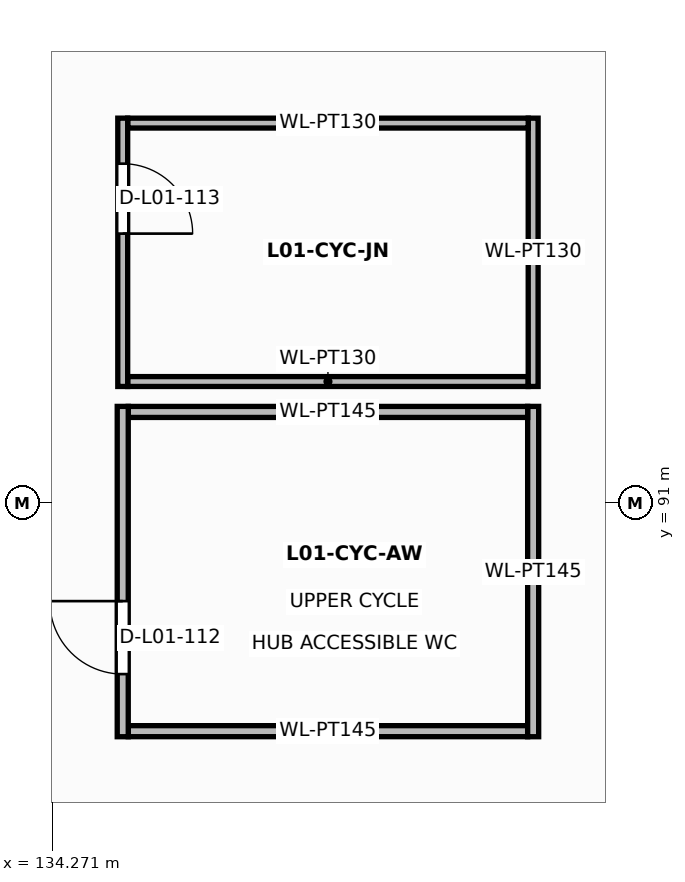
"""IFC4 building model, lengths in metres.
Left out: names, types, materials, properties, quantities, classifications, styles, units other than length and angle.
Written with IfcOpenShell. Run it as: python <this file> out.ifc"""

import sys

from ifc_helpers import new_model, si_unit, direction, frame, frame_2d, origin, place, context, subcontext, project, spatial, rectangle, extrude, element, fill, save


model = new_model("IFC4")
c1 = context("Model", 3, precision=1e-05, world=origin(), true_north=direction((0.0, 1.0)))
c2 = subcontext(c1, "Body", "Model", "MODEL_VIEW")
j1 = project(units=[si_unit("LENGTHUNIT", "METRE"), si_unit("PLANEANGLEUNIT", "RADIAN")], contexts=[c1])
p1 = place(None, origin())
s1 = spatial("IfcSite", under=j1, at=p1, CompositionType="ELEMENT")
p2 = place(p1, origin())
s2 = spatial("IfcBuilding", under=s1, at=p2, CompositionType="ELEMENT")
p3 = place(p2, frame((0.0, 0.0, 6.0)))
s3 = spatial("IfcBuildingStorey", under=s2, at=p3, CompositionType="ELEMENT", Elevation=6.0)
p4 = place(p3, frame((135.272, 88.0, 0.0), z_axis=(0.0, 0.0, 1.0), x_axis=(1.0, 0.0, 0.0)))
e1 = element("IfcWall", 1, at=p4, inside=s3, PredefinedType="PARTITIONING", context=c2, shape_type="SweptSolid", body=[
    extrude(rectangle(XDim=5.256, YDim=0.145, at=frame_2d((2.628, 0.0))), origin(), (0.0, 0.0, 1.0), 4.87),
])
p5 = place(p3, frame((140.6, 87.927, 0.0), z_axis=(0.0, 0.0, 1.0), x_axis=(0.0, 1.0, 0.0)))
e2 = element("IfcWall", 2, at=p5, inside=s3, PredefinedType="PARTITIONING", context=c2, shape_type="SweptSolid", body=[
    extrude(rectangle(XDim=4.346, YDim=0.145, at=frame_2d((2.173, 0.0))), origin(), (0.0, 0.0, 1.0), 4.87),
])
p6 = place(p3, frame((140.528, 92.2, 0.0), z_axis=(0.0, 0.0, 1.0), x_axis=(-1.0, 0.0, 0.0)))
e3 = element("IfcWall", 3, at=p6, inside=s3, PredefinedType="PARTITIONING", context=c2, shape_type="SweptSolid", body=[
    extrude(rectangle(XDim=5.256, YDim=0.145, at=frame_2d((2.628, 0.0))), origin(), (0.0, 0.0, 1.0), 4.87),
])
p7 = place(p3, frame((135.2, 92.273, 0.0), z_axis=(0.0, 0.0, 1.0), x_axis=(0.0, -1.0, 0.0)))
e4 = element("IfcWall", 4, at=p7, inside=s3, PredefinedType="PARTITIONING", context=c2, shape_type="SweptSolid", body=[
    extrude(rectangle(XDim=4.346, YDim=0.145, at=frame_2d((2.173, 0.0))), origin(), (0.0, 0.0, 1.0), 4.87),
])
p8 = place(p7, frame((2.562, 0.0, 0.0)))
e5 = element("IfcOpeningElement", 5, at=p8, cuts=e4, PredefinedType="OPENING", context=c2, shape_type="SweptSolid", body=[
    extrude(rectangle(XDim=0.96, YDim=2.12, at=frame_2d((0.48, 1.06))), frame((0.0, 0.083, 0.0), z_axis=(0.0, -1.0, 0.0), x_axis=(1.0, 0.0, 0.0)), (0.0, 0.0, 1.0), 0.165),
])
p9 = place(p3, frame((135.265, 92.6, 0.0), z_axis=(0.0, 0.0, 1.0), x_axis=(1.0, 0.0, 0.0)))
e6 = element("IfcWall", 6, at=p9, inside=s3, PredefinedType="PARTITIONING", context=c2, shape_type="SweptSolid", body=[
    extrude(rectangle(XDim=5.27, YDim=0.13, at=frame_2d((2.635, 0.0))), origin(), (0.0, 0.0, 1.0), 4.87),
])
p10 = place(p3, frame((140.6, 92.535, 0.0), z_axis=(0.0, 0.0, 1.0), x_axis=(0.0, 1.0, 0.0)))
e7 = element("IfcWall", 7, at=p10, inside=s3, PredefinedType="PARTITIONING", context=c2, shape_type="SweptSolid", body=[
    extrude(rectangle(XDim=3.53, YDim=0.13, at=frame_2d((1.765, 0.0))), origin(), (0.0, 0.0, 1.0), 4.87),
])
p11 = place(p3, frame((140.535, 96.0, 0.0), z_axis=(0.0, 0.0, 1.0), x_axis=(-1.0, 0.0, 0.0)))
e8 = element("IfcWall", 8, at=p11, inside=s3, PredefinedType="PARTITIONING", context=c2, shape_type="SweptSolid", body=[
    extrude(rectangle(XDim=5.27, YDim=0.13, at=frame_2d((2.635, 0.0))), origin(), (0.0, 0.0, 1.0), 4.87),
])
p12 = place(p3, frame((135.2, 96.065, 0.0), z_axis=(0.0, 0.0, 1.0), x_axis=(0.0, -1.0, 0.0)))
e9 = element("IfcWall", 9, at=p12, inside=s3, PredefinedType="PARTITIONING", context=c2, shape_type="SweptSolid", body=[
    extrude(rectangle(XDim=3.53, YDim=0.13, at=frame_2d((1.765, 0.0))), origin(), (0.0, 0.0, 1.0), 4.87),
])
p13 = place(p12, frame((0.599, 0.0, 0.0)))
e10 = element("IfcOpeningElement", 10, at=p13, cuts=e9, PredefinedType="OPENING", context=c2, shape_type="SweptSolid", body=[
    extrude(rectangle(XDim=0.92, YDim=2.1, at=frame_2d((0.46, 1.05))), frame((0.0, 0.075, 0.0), z_axis=(0.0, -1.0, 0.0), x_axis=(1.0, 0.0, 0.0)), (0.0, 0.0, 1.0), 0.15),
])
p14 = place(p8, frame((0.96, 0.0, 0.0), z_axis=(0.0, 0.0, 1.0), x_axis=(-1.0, 0.0, 0.0)))
e11 = element("IfcDoor", 11, at=p14, inside=s3, OperationType="SINGLE_SWING_LEFT", PredefinedType="DOOR", context=c2, shape_type="SweptSolid", body=[
    extrude(rectangle(XDim=0.96, YDim=2.12, at=frame_2d((0.48, 1.06))), frame((0.0, 0.025, 0.0), z_axis=(0.0, -1.0, 0.0), x_axis=(1.0, 0.0, 0.0)), (0.0, 0.0, 1.0), 0.05),
])
fill(e5, e11)
p15 = place(p13, origin())
e12 = element("IfcDoor", 12, at=p15, inside=s3, OperationType="SINGLE_SWING_RIGHT", PredefinedType="DOOR", context=c2, shape_type="SweptSolid", body=[
    extrude(rectangle(XDim=0.92, YDim=2.1, at=frame_2d((0.46, 1.05))), frame((0.0, 0.025, 0.0), z_axis=(0.0, -1.0, 0.0), x_axis=(1.0, 0.0, 0.0)), (0.0, 0.0, 1.0), 0.05),
])
fill(e10, e12)
save(model, sys.argv[1])
